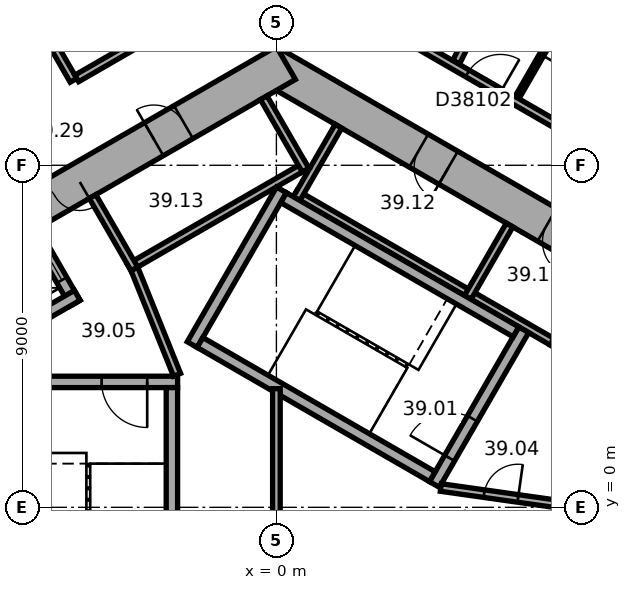
"""IFC4 building model, lengths in metres.
Left out: names, types, materials, properties, quantities, classifications, styles, units other than length and angle.
Written with IfcOpenShell. Run it as: python <this file> out.ifc"""

import sys

from ifc_helpers import new_model, si_unit, direction, frame, frame_2d, origin, place, context, subcontext, project, spatial, rectangle, extrude, element, fill, save


model = new_model("IFC4")
c1 = context("Model", 3, precision=1e-05, world=origin(), true_north=direction((0.0, 1.0)))
c2 = subcontext(c1, "Body", "Model", "MODEL_VIEW")
j1 = project(units=[si_unit("LENGTHUNIT", "METRE"), si_unit("PLANEANGLEUNIT", "RADIAN")], contexts=[c1])
p1 = place(None, origin())
s1 = spatial("IfcSite", under=j1, at=p1, CompositionType="ELEMENT")
p2 = place(p1, origin())
s2 = spatial("IfcBuilding", under=s1, at=p2, CompositionType="ELEMENT")
p3 = place(p2, frame((0.0, 0.0, 161.4)))
s3 = spatial("IfcBuildingStorey", under=s2, at=p3, CompositionType="ELEMENT", Elevation=161.4)
p4 = place(p3, frame((10.25, 5.629, 0.0), z_axis=(0.0, 0.0, 1.0), x_axis=(-0.866022616891, 0.50000482701, 0.0)))
e1 = element("IfcWall", 1, at=p4, inside=s3, PredefinedType="SHEAR", context=c2, shape_type="SweptSolid", body=[
    extrude(rectangle(XDim=12.125, YDim=1.0, at=frame_2d((6.062, 0.0))), origin(), (0.0, 0.0, 1.0), 3.7),
])
p5 = place(p4, frame((2.712, 0.0, 0.0)))
e2 = element("IfcOpeningElement", 2, at=p5, cuts=e1, PredefinedType="OPENING", context=c2, shape_type="SweptSolid", body=[
    extrude(rectangle(XDim=0.9, YDim=2.1, at=frame_2d((0.45, 1.05))), frame((0.0, 0.51, 0.0), z_axis=(0.0, -1.0, 0.0), x_axis=(1.0, 0.0, 0.0)), (0.0, 0.0, 1.0), 1.02),
])
p6 = place(p4, frame((6.612, 0.0, 0.0)))
e3 = element("IfcOpeningElement", 3, at=p6, cuts=e1, PredefinedType="OPENING", context=c2, shape_type="SweptSolid", body=[
    extrude(rectangle(XDim=0.9, YDim=2.1, at=frame_2d((0.45, 1.05))), frame((0.0, 0.51, 0.0), z_axis=(0.0, -1.0, 0.0), x_axis=(1.0, 0.0, 0.0)), (0.0, 0.0, 1.0), 1.02),
])
p7 = place(p3, frame((0.25, 11.691, 0.0), z_axis=(0.0, 0.0, 1.0), x_axis=(-0.866022616891, -0.50000482701, 0.0)))
e4 = element("IfcWall", 4, at=p7, inside=s3, PredefinedType="SHEAR", context=c2, shape_type="SweptSolid", body=[
    extrude(rectangle(XDim=12.125, YDim=1.0, at=frame_2d((6.062, 0.0))), origin(), (0.0, 0.0, 1.0), 3.7),
])
p8 = place(p7, frame((6.262, 0.0, 0.0)))
e5 = element("IfcOpeningElement", 5, at=p8, cuts=e4, PredefinedType="OPENING", context=c2, shape_type="SweptSolid", body=[
    extrude(rectangle(XDim=1.5, YDim=2.1, at=frame_2d((0.75, 1.05))), frame((0.0, 0.51, 0.0), z_axis=(0.0, -1.0, 0.0), x_axis=(1.0, 0.0, 0.0)), (0.0, 0.0, 1.0), 1.02),
])
p9 = place(p7, frame((3.112, 0.0, 0.0)))
e6 = element("IfcOpeningElement", 6, at=p9, cuts=e4, PredefinedType="OPENING", context=c2, shape_type="SweptSolid", body=[
    extrude(rectangle(XDim=0.9, YDim=2.1, at=frame_2d((0.45, 1.05))), frame((0.0, 0.51, 0.0), z_axis=(0.0, -1.0, 0.0), x_axis=(1.0, 0.0, 0.0)), (0.0, 0.0, 1.0), 1.02),
])
p10 = place(p3, frame((7.424, 4.259, 0.0), z_axis=(0.0, 0.0, 1.0), x_axis=(-0.866026010844, 0.49999894854, 0.0)))
e7 = element("IfcWall", 7, at=p10, inside=s3, PredefinedType="PARTITIONING", context=c2, shape_type="SweptSolid", body=[
    extrude(rectangle(XDim=8.0, YDim=0.2, at=frame_2d((4.0, 0.0))), origin(), (0.0, 0.0, 1.0), 3.42),
])
for number, where, z_axis, x_axis in (
    (8, (7.287, 4.222, 0.0), (0.0, 0.0, 1.0), (0.5, 0.866, 0.0)),
    (9, (5.036, 5.522, 0.0), (0.0, 0.0, 1.0), (0.5, 0.866, 0.0)),
    (10, (0.532, 8.122, 0.0), (0.0, 0.0, 1.0), (0.5, 0.866, 0.0)),
):
    element("IfcWall", number, at=place(p3, frame(where, z_axis=z_axis, x_axis=x_axis)), inside=s3, PredefinedType="PARTITIONING", context=c2, shape_type="SweptSolid", body=[
        extrude(rectangle(XDim=2.2, YDim=0.2, at=frame_2d((1.1, 0.0))), origin(), (0.0, 0.0, 1.0), 3.42),
    ])
p11 = place(p3, frame((0.803, 9.009, 0.0), z_axis=(0.0, 0.0, 1.0), x_axis=(-0.866028230842, -0.499995103361, 0.0)))
e11 = element("IfcWall", 11, at=p11, inside=s3, PredefinedType="PARTITIONING", context=c2, shape_type="SweptSolid", body=[
    extrude(rectangle(XDim=5.4, YDim=0.2, at=frame_2d((2.7, 0.0))), origin(), (0.0, 0.0, 1.0), 3.42),
])
p12 = place(p3, frame((0.767, 8.872, 0.0), z_axis=(0.0, 0.0, 1.0), x_axis=(-0.499994660107, 0.866028486751, 0.0)))
e12 = element("IfcWall", 12, at=p12, inside=s3, PredefinedType="PARTITIONING", context=c2, shape_type="SweptSolid", body=[
    extrude(rectangle(XDim=2.2, YDim=0.2, at=frame_2d((1.1, 0.0))), origin(), (0.0, 0.0, 1.0), 3.42),
])
p13 = place(p3, frame((-3.737, 6.272, 0.0), z_axis=(0.0, 0.0, 1.0), x_axis=(-0.50002983664, 0.866008176907, 0.0)))
e13 = element("IfcWall", 13, at=p13, inside=s3, PredefinedType="PARTITIONING", context=c2, shape_type="SweptSolid", body=[
    extrude(rectangle(XDim=2.2, YDim=0.2, at=frame_2d((1.1, 0.0))), origin(), (0.0, 0.0, 1.0), 3.42),
])
p14 = place(p3, frame((4.158, 0.602, 0.0), z_axis=(0.0, 0.0, 1.0), x_axis=(0.499977259774, 0.866038532462, 0.0)))
e14 = element("IfcWall", 14, at=p14, inside=s3, PredefinedType="SHEAR", context=c2, shape_type="SweptSolid", body=[
    extrude(rectangle(XDim=4.7, YDim=0.3, at=frame_2d((2.35, 0.0))), origin(), (0.0, 0.0, 1.0), 3.42),
])
p15 = place(p14, frame((0.8, 0.0, 0.0)))
e15 = element("IfcOpeningElement", 15, at=p15, cuts=e14, PredefinedType="OPENING", context=c2, shape_type="SweptSolid", body=[
    extrude(rectangle(XDim=1.2, YDim=2.1, at=frame_2d((0.6, 1.05))), frame((0.0, 0.16, 0.0), z_axis=(0.0, -1.0, 0.0), x_axis=(1.0, 0.0, 0.0)), (0.0, 0.0, 1.0), 0.32),
])
p16 = place(p3, frame((-2.216, 4.282, 0.0), z_axis=(0.0, 0.0, 1.0), x_axis=(0.499977259774, 0.866038532462, 0.0)))
e16 = element("IfcWall", 16, at=p16, inside=s3, PredefinedType="SHEAR", context=c2, shape_type="SweptSolid", body=[
    extrude(rectangle(XDim=4.7, YDim=0.3, at=frame_2d((2.35, 0.0))), origin(), (0.0, 0.0, 1.0), 3.42),
])
for number, where, z_axis, x_axis in (
    (17, (4.103, 0.807, 0.0), (0.0, 0.0, 1.0), (-0.866, 0.5, 0.0)),
    (18, (6.303, 4.617, 0.0), (0.0, 0.0, 1.0), (-0.866, 0.5, 0.0)),
):
    element("IfcWall", number, at=place(p3, frame(where, z_axis=z_axis, x_axis=x_axis)), inside=s3, PredefinedType="SHEAR", context=c2, shape_type="SweptSolid", body=[
        extrude(rectangle(XDim=7.06, YDim=0.3, at=frame_2d((3.53, 0.0))), origin(), (0.0, 0.0, 1.0), 3.42),
    ])
p17 = place(p3, frame((-2.6, 3.3, 0.0), z_axis=(0.0, 0.0, 1.0), x_axis=(-1.0, 0.0, 0.0)))
e19 = element("IfcWall", 19, at=p17, inside=s3, PredefinedType="SHEAR", context=c2, shape_type="SweptSolid", body=[
    extrude(rectangle(XDim=4.7, YDim=0.3, at=frame_2d((2.35, 0.0))), origin(), (0.0, 0.0, 1.0), 3.42),
])
p18 = place(p17, frame((0.8, 0.0, 0.0)))
e20 = element("IfcOpeningElement", 20, at=p18, cuts=e19, PredefinedType="OPENING", context=c2, shape_type="SweptSolid", body=[
    extrude(rectangle(XDim=1.2, YDim=2.1, at=frame_2d((0.6, 1.05))), frame((0.0, 0.16, 0.0), z_axis=(0.0, -1.0, 0.0), x_axis=(1.0, 0.0, 0.0)), (0.0, 0.0, 1.0), 0.32),
])
p19 = place(p3, frame((-2.75, 3.15, 0.0), z_axis=(0.0, 0.0, 1.0), x_axis=(0.0, -1.0, 0.0)))
e21 = element("IfcWall", 21, at=p19, inside=s3, PredefinedType="SHEAR", context=c2, shape_type="SweptSolid", body=[
    extrude(rectangle(XDim=7.06, YDim=0.3, at=frame_2d((3.53, 0.0))), origin(), (0.0, 0.0, 1.0), 3.42),
])
p20 = place(p3, frame((4.327, 0.521, 0.0), z_axis=(0.0, 0.0, 1.0), x_axis=(0.990124376366, -0.14019172346, 0.0)))
e22 = element("IfcWall", 22, at=p20, inside=s3, PredefinedType="PARTITIONING", context=c2, shape_type="SweptSolid", body=[
    extrude(rectangle(XDim=3.002, YDim=0.2, at=frame_2d((1.501, 0.0))), origin(), (0.0, 0.0, 1.0), 3.42),
])
p21 = place(p20, frame((1.15, 0.0, 0.0)))
e23 = element("IfcOpeningElement", 23, at=p21, cuts=e22, PredefinedType="OPENING", context=c2, shape_type="SweptSolid", body=[
    extrude(rectangle(XDim=0.9, YDim=2.1, at=frame_2d((0.45, 1.05))), frame((0.0, 0.11, 0.0), z_axis=(0.0, -1.0, 0.0), x_axis=(1.0, 0.0, 0.0)), (0.0, 0.0, 1.0), 0.22),
])
p22 = place(p3, frame((-5.295, 5.372, 0.0), z_axis=(0.0, 0.0, 1.0), x_axis=(-0.500077893725, 0.86598042715, 0.0)))
e24 = element("IfcWall", 24, at=p22, inside=s3, PredefinedType="SHEAR", context=c2, shape_type="SweptSolid", body=[
    extrude(rectangle(XDim=2.2, YDim=0.3, at=frame_2d((1.1, 0.0))), origin(), (0.0, 0.0, 1.0), 3.42),
])
p23 = place(p22, frame((0.7, 0.0, 0.0)))
e25 = element("IfcOpeningElement", 25, at=p23, cuts=e24, PredefinedType="OPENING", context=c2, shape_type="SweptSolid", body=[
    extrude(rectangle(XDim=1.1, YDim=2.1, at=frame_2d((0.55, 1.05))), frame((0.0, 0.16, 0.0), z_axis=(0.0, -1.0, 0.0), x_axis=(1.0, 0.0, 0.0)), (0.0, 0.0, 1.0), 0.32),
])
p24 = place(p3, frame((-5.24, 5.577, 0.0), z_axis=(0.0, 0.0, 1.0), x_axis=(-0.866014461049, -0.500018952895, 0.0)))
e26 = element("IfcWall", 26, at=p24, inside=s3, PredefinedType="SHEAR", context=c2, shape_type="SweptSolid", body=[
    extrude(rectangle(XDim=3.35, YDim=0.3, at=frame_2d((1.675, 0.0))), origin(), (0.0, 0.0, 1.0), 3.42),
])
p25 = place(p3, frame((-2.615, 3.487, 0.0), z_axis=(0.0, 0.0, 1.0), x_axis=(-0.373576831041, 0.92759924068, 0.0)))
e27 = element("IfcWall", 27, at=p25, inside=s3, PredefinedType="PARTITIONING", context=c2, shape_type="SweptSolid", body=[
    extrude(rectangle(XDim=3.002, YDim=0.2, at=frame_2d((1.501, 0.0))), origin(), (0.0, 0.0, 1.0), 3.42),
])
p26 = place(p3, frame((0.0, -3.122, 0.0), z_axis=(0.0, 0.0, 1.0), x_axis=(0.0, 1.0, 0.0)))
e28 = element("IfcWall", 28, at=p26, inside=s3, PredefinedType="PARTITIONING", context=c2, shape_type="SweptSolid", body=[
    extrude(rectangle(XDim=6.245, YDim=0.2, at=frame_2d((3.122, 0.0))), origin(), (0.0, 0.0, 1.0), 3.42),
])
p27 = place(p3, frame((-9.515, 18.466, 0.0), z_axis=(0.0, 0.0, 1.0), x_axis=(0.500010139422, -0.866019549707, 0.0)))
e29 = element("IfcWall", 29, at=p27, inside=s3, PredefinedType="PARTITIONING", context=c2, shape_type="SweptSolid", body=[
    extrude(rectangle(XDim=8.35, YDim=0.2, at=frame_2d((4.175, 0.0))), origin(), (0.0, 0.0, 1.0), 2.87),
])
p28 = place(p27, frame((3.675, 0.0, 0.0)))
e30 = element("IfcOpeningElement", 30, at=p28, cuts=e29, PredefinedType="OPENING", context=c2, shape_type="SweptSolid", body=[
    extrude(rectangle(XDim=1.0, YDim=2.1, at=frame_2d((0.5, 1.05))), frame((0.0, 0.11, 0.0), z_axis=(0.0, -1.0, 0.0), x_axis=(1.0, 0.0, 0.0)), (0.0, 0.0, 1.0), 0.22),
])
p29 = place(p3, frame((-0.95, 13.77, 0.0), z_axis=(0.0, 0.0, 1.0), x_axis=(-0.866036689987, -0.499980451214, 0.0)))
e31 = element("IfcWall", 31, at=p29, inside=s3, PredefinedType="PARTITIONING", context=c2, shape_type="SweptSolid", body=[
    extrude(rectangle(XDim=4.969, YDim=0.2, at=frame_2d((2.485, 0.0))), origin(), (0.0, 0.0, 1.0), 3.42),
])
p30 = place(p3, frame((6.33, 10.779, 0.0), z_axis=(0.0, 0.0, 1.0), x_axis=(0.500010275428, 0.866019471182, 0.0)))
e32 = element("IfcWall", 32, at=p30, inside=s3, PredefinedType="PARTITIONING", context=c2, shape_type="SweptSolid", body=[
    extrude(rectangle(XDim=3.5, YDim=0.12, at=frame_2d((1.75, 0.0))), origin(), (0.0, 0.0, 1.0), 3.42),
])
p31 = place(p30, frame((1.3, 0.0, 0.0)))
e33 = element("IfcOpeningElement", 33, at=p31, cuts=e32, PredefinedType="OPENING", context=c2, shape_type="SweptSolid", body=[
    extrude(rectangle(XDim=0.9, YDim=2.1, at=frame_2d((0.45, 1.05))), frame((0.0, 0.07, 0.0), z_axis=(0.0, -1.0, 0.0), x_axis=(1.0, 0.0, 0.0)), (0.0, 0.0, 1.0), 0.14),
])
p32 = place(p3, frame((8.37, 19.013, 0.0), z_axis=(0.0, 0.0, 1.0), x_axis=(-0.446183598632, -0.894941448538, 0.0)))
e34 = element("IfcWall", 34, at=p32, inside=s3, PredefinedType="PARTITIONING", context=c2, shape_type="SweptSolid", body=[
    extrude(rectangle(XDim=8.156, YDim=0.2, at=frame_2d((4.078, 0.0))), origin(), (0.0, 0.0, 1.0), 3.42),
])
p33 = place(p3, frame((9.224, 8.993, 0.0), z_axis=(0.0, 0.0, 1.0), x_axis=(-0.866031754707, 0.499988999718, 0.0)))
e35 = element("IfcWall", 35, at=p33, inside=s3, PredefinedType="PARTITIONING", context=c2, shape_type="SweptSolid", body=[
    extrude(rectangle(XDim=9.514, YDim=0.2, at=frame_2d((4.757, 0.0))), origin(), (0.0, 0.0, 1.0), 3.42),
])
p34 = place(p33, frame((3.848, 0.0, 0.0)))
e36 = element("IfcOpeningElement", 36, at=p34, cuts=e35, PredefinedType="OPENING", context=c2, shape_type="SweptSolid", body=[
    extrude(rectangle(XDim=1.0, YDim=2.1, at=frame_2d((0.5, 1.05))), frame((0.0, 0.11, 0.0), z_axis=(0.0, -1.0, 0.0), x_axis=(1.0, 0.0, 0.0)), (0.0, 0.0, 1.0), 0.22),
])
p35 = place(p8, origin())
e37 = element("IfcDoor", 37, at=p35, inside=s3, OperationType="DOUBLE_DOOR_SINGLE_SWING", PredefinedType="DOOR", context=c2, shape_type="SweptSolid", body=[
    extrude(rectangle(XDim=1.5, YDim=2.1, at=frame_2d((0.75, 1.05))), frame((0.0, 0.025, 0.0), z_axis=(0.0, -1.0, 0.0), x_axis=(1.0, 0.0, 0.0)), (0.0, 0.0, 1.0), 0.05),
])
fill(e5, e37)
p36 = place(p15, origin())
e38 = element("IfcDoor", 38, at=p36, inside=s3, OperationType="SINGLE_SWING_RIGHT", PredefinedType="DOOR", context=c2, shape_type="SweptSolid", body=[
    extrude(rectangle(XDim=1.2, YDim=2.1, at=frame_2d((0.6, 1.05))), frame((0.0, 0.025, 0.0), z_axis=(0.0, -1.0, 0.0), x_axis=(1.0, 0.0, 0.0)), (0.0, 0.0, 1.0), 0.05),
])
fill(e15, e38)
p37 = place(p18, origin())
e39 = element("IfcDoor", 39, at=p37, inside=s3, OperationType="SINGLE_SWING_RIGHT", PredefinedType="DOOR", context=c2, shape_type="SweptSolid", body=[
    extrude(rectangle(XDim=1.2, YDim=2.1, at=frame_2d((0.6, 1.05))), frame((0.0, 0.025, 0.0), z_axis=(0.0, -1.0, 0.0), x_axis=(1.0, 0.0, 0.0)), (0.0, 0.0, 1.0), 0.05),
])
fill(e20, e39)
p38 = place(p21, origin())
e40 = element("IfcDoor", 40, at=p38, inside=s3, OperationType="SINGLE_SWING_LEFT", PredefinedType="DOOR", context=c2, shape_type="SweptSolid", body=[
    extrude(rectangle(XDim=0.9, YDim=2.1, at=frame_2d((0.45, 1.05))), frame((0.0, 0.025, 0.0), z_axis=(0.0, -1.0, 0.0), x_axis=(1.0, 0.0, 0.0)), (0.0, 0.0, 1.0), 0.05),
])
fill(e23, e40)
p39 = place(p5, origin())
e41 = element("IfcDoor", 41, at=p39, inside=s3, OperationType="SINGLE_SWING_LEFT", PredefinedType="DOOR", context=c2, shape_type="SweptSolid", body=[
    extrude(rectangle(XDim=0.9, YDim=2.1, at=frame_2d((0.45, 1.05))), frame((0.0, 0.025, 0.0), z_axis=(0.0, -1.0, 0.0), x_axis=(1.0, 0.0, 0.0)), (0.0, 0.0, 1.0), 0.05),
])
fill(e2, e41)
p40 = place(p6, origin())
e42 = element("IfcDoor", 42, at=p40, inside=s3, OperationType="SINGLE_SWING_LEFT", PredefinedType="DOOR", context=c2, shape_type="SweptSolid", body=[
    extrude(rectangle(XDim=0.9, YDim=2.1, at=frame_2d((0.45, 1.05))), frame((0.0, 0.025, 0.0), z_axis=(0.0, -1.0, 0.0), x_axis=(1.0, 0.0, 0.0)), (0.0, 0.0, 1.0), 0.05),
])
fill(e3, e42)
p41 = place(p9, origin())
e43 = element("IfcDoor", 43, at=p41, inside=s3, OperationType="SINGLE_SWING_LEFT", PredefinedType="DOOR", context=c2, shape_type="SweptSolid", body=[
    extrude(rectangle(XDim=0.9, YDim=2.1, at=frame_2d((0.45, 1.05))), frame((0.0, 0.025, 0.0), z_axis=(0.0, -1.0, 0.0), x_axis=(1.0, 0.0, 0.0)), (0.0, 0.0, 1.0), 0.05),
])
fill(e6, e43)
p42 = place(p23, origin())
e44 = element("IfcDoor", 44, at=p42, inside=s3, OperationType="DOUBLE_DOOR_SLIDING", PredefinedType="DOOR", context=c2, shape_type="SweptSolid", body=[
    extrude(rectangle(XDim=1.1, YDim=2.1, at=frame_2d((0.55, 1.05))), frame((0.0, 0.025, 0.0), z_axis=(0.0, -1.0, 0.0), x_axis=(1.0, 0.0, 0.0)), (0.0, 0.0, 1.0), 0.05),
])
fill(e25, e44)
p43 = place(p34, origin())
e45 = element("IfcDoor", 45, at=p43, inside=s3, OperationType="SINGLE_SWING_LEFT", PredefinedType="DOOR", context=c2, shape_type="SweptSolid", body=[
    extrude(rectangle(XDim=1.0, YDim=2.1, at=frame_2d((0.5, 1.05))), frame((0.0, 0.025, 0.0), z_axis=(0.0, -1.0, 0.0), x_axis=(1.0, 0.0, 0.0)), (0.0, 0.0, 1.0), 0.05),
])
fill(e36, e45)
p44 = place(p31, origin())
e46 = element("IfcDoor", 46, at=p44, inside=s3, OperationType="SINGLE_SWING_LEFT", PredefinedType="DOOR", context=c2, shape_type="SweptSolid", body=[
    extrude(rectangle(XDim=0.9, YDim=2.1, at=frame_2d((0.45, 1.05))), frame((0.0, 0.025, 0.0), z_axis=(0.0, -1.0, 0.0), x_axis=(1.0, 0.0, 0.0)), (0.0, 0.0, 1.0), 0.05),
])
fill(e33, e46)
save(model, sys.argv[1])
